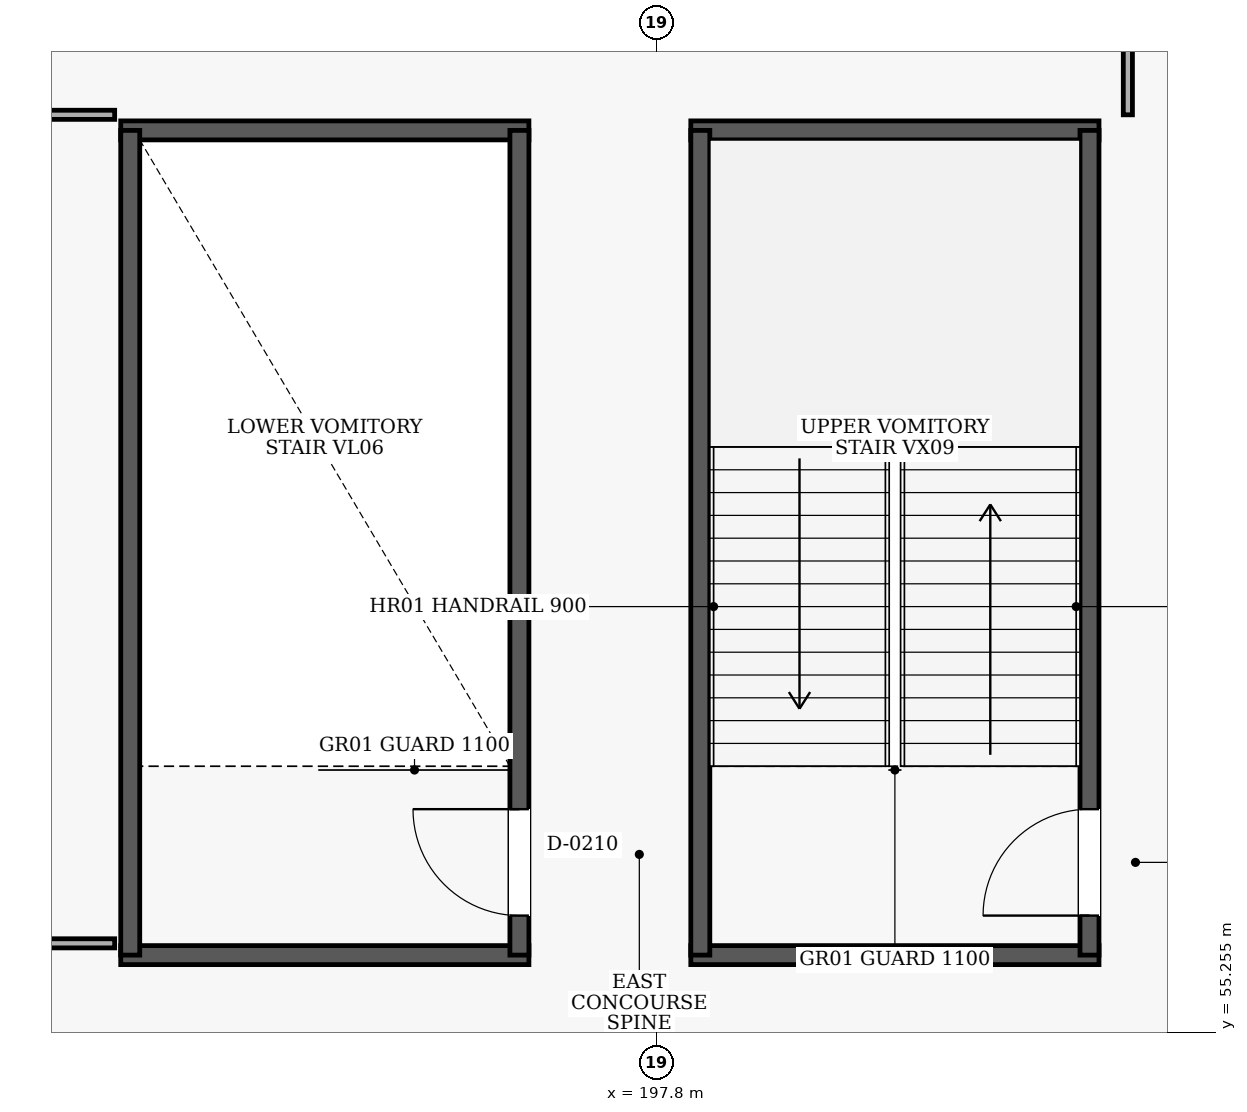
"""IFC4 building model, lengths in metres.
Left out: names, types, materials, properties, quantities, classifications, styles, units other than length and angle.
Written with IfcOpenShell. Run it as: python <this file> out.ifc"""

import sys

from ifc_helpers import new_model, si_unit, direction, frame, frame_2d, origin, place, context, subcontext, project, spatial, rectangle, extrude, element, fill, save


model = new_model("IFC4")
c1 = context("Model", 3, precision=1e-05, world=origin(), true_north=direction((0.0, 1.0)))
c2 = subcontext(c1, "Body", "Model", "MODEL_VIEW")
j1 = project(units=[si_unit("LENGTHUNIT", "METRE"), si_unit("PLANEANGLEUNIT", "RADIAN")], contexts=[c1])
p1 = place(None, origin())
s1 = spatial("IfcSite", under=j1, at=p1, CompositionType="ELEMENT")
p2 = place(p1, origin())
s2 = spatial("IfcBuilding", under=s1, at=p2, CompositionType="ELEMENT")
p3 = place(p2, frame((0.0, 0.0, 5.4)))
s3 = spatial("IfcBuildingStorey", under=s2, at=p3, CompositionType="ELEMENT", Elevation=5.4)
for number, where, z_axis, x_axis in (
    (1, (198.25, 56.275, 0.0), (0.0, 0.0, 1.0), (1.0, 0.0, 0.0)),
    (2, (203.62, 67.125, 0.0), (0.0, 0.0, 1.0), (-1.0, 0.0, 0.0)),
):
    element("IfcWall", number, at=place(p3, frame(where, z_axis=z_axis, x_axis=x_axis)), inside=s3, PredefinedType="SHEAR", context=c2, shape_type="SweptSolid", body=[
        extrude(rectangle(XDim=5.37, YDim=0.25, at=frame_2d((2.685, 0.0))), origin(), (0.0, 0.0, 1.0), 4.5),
    ])
p4 = place(p3, frame((198.375, 56.275, 0.0), z_axis=(0.0, 0.0, 1.0), x_axis=(0.0, 1.0, 0.0)))
e3 = element("IfcWall", 3, at=p4, inside=s3, PredefinedType="SHEAR", context=c2, shape_type="SweptSolid", body=[
    extrude(rectangle(XDim=10.85, YDim=0.25, at=frame_2d((5.425, 0.0))), origin(), (0.0, 0.0, 1.0), 4.5),
])
p5 = place(p3, frame((203.495, 56.275, 0.0), z_axis=(0.0, 0.0, 1.0), x_axis=(0.0, 1.0, 0.0)))
e4 = element("IfcWall", 4, at=p5, inside=s3, PredefinedType="SHEAR", context=c2, shape_type="SweptSolid", body=[
    extrude(rectangle(XDim=10.85, YDim=0.25, at=frame_2d((5.425, 0.0))), origin(), (0.0, 0.0, 1.0), 4.5),
])
p6 = place(p5, frame((0.52, 0.0, 0.0)))
e5 = element("IfcOpeningElement", 5, at=p6, cuts=e4, PredefinedType="OPENING", context=c2, shape_type="SweptSolid", body=[
    extrude(rectangle(XDim=1.4, YDim=2.15, at=frame_2d((0.7, 1.075))), frame((0.0, 0.135, 0.0), z_axis=(0.0, -1.0, 0.0), x_axis=(1.0, 0.0, 0.0)), (0.0, 0.0, 1.0), 0.27),
])
for number, where, z_axis, x_axis in (
    (6, (190.75, 56.275, 0.0), (0.0, 0.0, 1.0), (1.0, 0.0, 0.0)),
    (7, (196.12, 67.125, 0.0), (0.0, 0.0, 1.0), (-1.0, 0.0, 0.0)),
):
    element("IfcWall", number, at=place(p3, frame(where, z_axis=z_axis, x_axis=x_axis)), inside=s3, PredefinedType="SHEAR", context=c2, shape_type="SweptSolid", body=[
        extrude(rectangle(XDim=5.37, YDim=0.25, at=frame_2d((2.685, 0.0))), origin(), (0.0, 0.0, 1.0), 4.5),
    ])
p7 = place(p3, frame((190.875, 56.275, 0.0), z_axis=(0.0, 0.0, 1.0), x_axis=(0.0, 1.0, 0.0)))
e8 = element("IfcWall", 8, at=p7, inside=s3, PredefinedType="SHEAR", context=c2, shape_type="SweptSolid", body=[
    extrude(rectangle(XDim=10.85, YDim=0.25, at=frame_2d((5.425, 0.0))), origin(), (0.0, 0.0, 1.0), 4.5),
])
p8 = place(p3, frame((195.995, 56.275, 0.0), z_axis=(0.0, 0.0, 1.0), x_axis=(0.0, 1.0, 0.0)))
e9 = element("IfcWall", 9, at=p8, inside=s3, PredefinedType="SHEAR", context=c2, shape_type="SweptSolid", body=[
    extrude(rectangle(XDim=10.85, YDim=0.25, at=frame_2d((5.425, 0.0))), origin(), (0.0, 0.0, 1.0), 4.5),
])
p9 = place(p8, frame((0.52, 0.0, 0.0)))
e10 = element("IfcOpeningElement", 10, at=p9, cuts=e9, PredefinedType="OPENING", context=c2, shape_type="SweptSolid", body=[
    extrude(rectangle(XDim=1.4, YDim=2.15, at=frame_2d((0.7, 1.075))), frame((0.0, 0.135, 0.0), z_axis=(0.0, -1.0, 0.0), x_axis=(1.0, 0.0, 0.0)), (0.0, 0.0, 1.0), 0.27),
])
p10 = place(p3, frame((204.0, 67.33, 0.0), z_axis=(0.0, 0.0, 1.0), x_axis=(0.0, 1.0, 0.0)))
e11 = element("IfcWall", 11, at=p10, inside=s3, PredefinedType="PARTITIONING", context=c2, shape_type="SweptSolid", body=[
    extrude(rectangle(XDim=2.648, YDim=0.12, at=frame_2d((1.324, 0.0))), origin(), (0.0, 0.0, 1.0), 4.5),
])
p11 = place(p10, frame((0.844, 0.0, 0.0)))
e12 = element("IfcOpeningElement", 12, at=p11, cuts=e11, PredefinedType="OPENING", context=c2, shape_type="SweptSolid", body=[
    extrude(rectangle(XDim=0.96, YDim=2.1, at=frame_2d((0.48, 1.05))), frame((0.0, 0.07, 0.0), z_axis=(0.0, -1.0, 0.0), x_axis=(1.0, 0.0, 0.0)), (0.0, 0.0, 1.0), 0.14),
])
p12 = place(p3, frame((175.6, 56.43, 0.0), z_axis=(0.0, 0.0, 1.0), x_axis=(1.0, 0.0, 0.0)))
e13 = element("IfcWall", 13, at=p12, inside=s3, PredefinedType="PARTITIONING", context=c2, shape_type="SweptSolid", body=[
    extrude(rectangle(XDim=15.07, YDim=0.12, at=frame_2d((7.535, 0.0))), origin(), (0.0, 0.0, 1.0), 4.5),
])
p13 = place(p12, frame((7.316, 0.0, 0.0)))
e14 = element("IfcOpeningElement", 14, at=p13, cuts=e13, PredefinedType="OPENING", context=c2, shape_type="SweptSolid", body=[
    extrude(rectangle(XDim=2.36, YDim=2.4, at=frame_2d((1.18, 1.2))), frame((0.0, 0.07, 0.0), z_axis=(0.0, -1.0, 0.0), x_axis=(1.0, 0.0, 0.0)), (0.0, 0.0, 1.0), 0.14),
])
p14 = place(p3, frame((190.67, 67.33, 0.0), z_axis=(0.0, 0.0, 1.0), x_axis=(-1.0, 0.0, 0.0)))
e15 = element("IfcWall", 15, at=p14, inside=s3, PredefinedType="PARTITIONING", context=c2, shape_type="SweptSolid", body=[
    extrude(rectangle(XDim=15.07, YDim=0.12, at=frame_2d((7.535, 0.0))), origin(), (0.0, 0.0, 1.0), 4.5),
])
p15 = place(p6, origin())
e16 = element("IfcDoor", 16, at=p15, inside=s3, OperationType="SINGLE_SWING_LEFT", PredefinedType="DOOR", context=c2, shape_type="SweptSolid", body=[
    extrude(rectangle(XDim=1.4, YDim=2.15, at=frame_2d((0.7, 1.075))), frame((0.0, 0.025, 0.0), z_axis=(0.0, -1.0, 0.0), x_axis=(1.0, 0.0, 0.0)), (0.0, 0.0, 1.0), 0.05),
])
fill(e5, e16)
p16 = place(p9, origin())
e17 = element("IfcDoor", 17, at=p16, inside=s3, OperationType="SINGLE_SWING_RIGHT", PredefinedType="DOOR", context=c2, shape_type="SweptSolid", body=[
    extrude(rectangle(XDim=1.4, YDim=2.15, at=frame_2d((0.7, 1.075))), frame((0.0, 0.025, 0.0), z_axis=(0.0, -1.0, 0.0), x_axis=(1.0, 0.0, 0.0)), (0.0, 0.0, 1.0), 0.05),
])
fill(e10, e17)
save(model, sys.argv[1])
